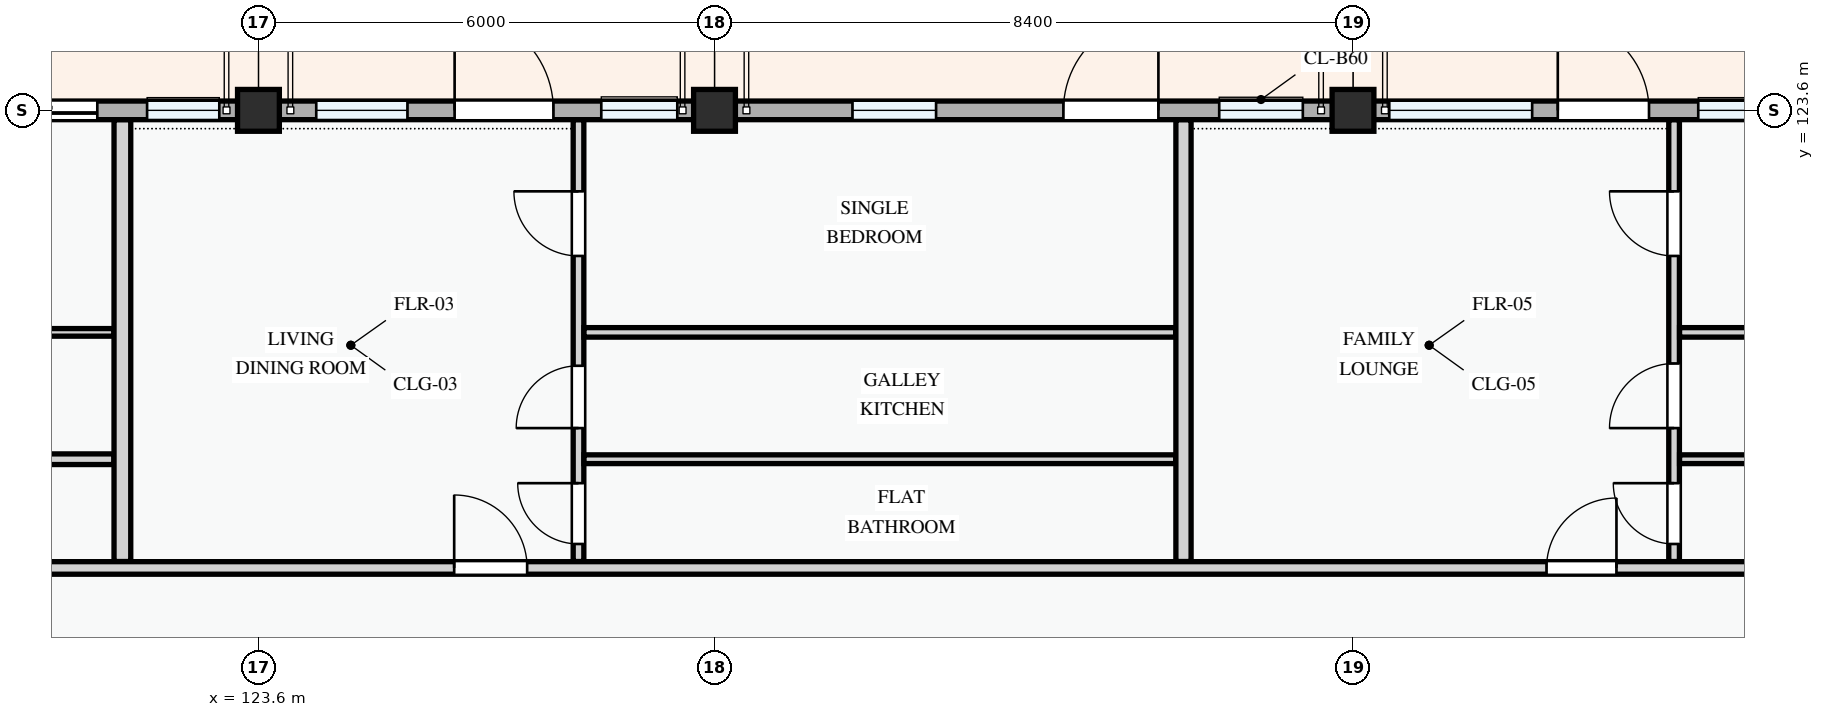
"""IFC4 building model, lengths in metres.
Left out: names, types, materials, properties, quantities, classifications, styles, units other than length and angle.
Written with IfcOpenShell. Run it as: python <this file> out.ifc"""

import sys

from ifc_helpers import new_model, si_unit, direction, frame, frame_2d, origin, origin_2d, place, context, subcontext, project, spatial, rectangle, extrude, element, fill, save


model = new_model("IFC4")
c1 = context("Model", 3, precision=1e-05, world=origin(), true_north=direction((0.0, 1.0)))
c2 = subcontext(c1, "Body", "Model", "MODEL_VIEW")
j1 = project(units=[si_unit("LENGTHUNIT", "METRE"), si_unit("PLANEANGLEUNIT", "RADIAN")], contexts=[c1])
p1 = place(None, origin())
s1 = spatial("IfcSite", under=j1, at=p1, CompositionType="ELEMENT")
p2 = place(p1, origin())
s2 = spatial("IfcBuilding", under=s1, at=p2, CompositionType="ELEMENT")
p3 = place(p2, frame((0.0, 0.0, 37.8)))
s3 = spatial("IfcBuildingStorey", under=s2, at=p3, CompositionType="ELEMENT", Elevation=37.8)
for number, where, z_axis, x_axis in (
    (1, (123.6, 123.6, 0.0), (0.0, 0.0, 1.0), (1.0, 0.0, 0.0)),
    (2, (129.6, 123.6, 0.0), (0.0, 0.0, 1.0), (1.0, 0.0, 0.0)),
    (3, (138.0, 123.6, 0.0), (0.0, 0.0, 1.0), (1.0, 0.0, 0.0)),
):
    element("IfcColumn", number, at=place(p3, frame(where, z_axis=z_axis, x_axis=x_axis)), inside=s3, PredefinedType="COLUMN", context=c2, shape_type="SweptSolid", body=[
        extrude(rectangle(XDim=0.55, YDim=0.55, at=origin_2d()), origin(), (0.0, 0.0, 1.0), 3.3),
    ])
p4 = place(p3, frame((144.0, 123.6, 0.0), z_axis=(0.0, 0.0, 1.0), x_axis=(-1.0, 0.0, 0.0)))
e4 = element("IfcWall", 4, at=p4, inside=s3, PredefinedType="STANDARD", context=c2, shape_type="SweptSolid", body=[
    extrude(rectangle(XDim=6.0, YDim=0.245, at=frame_2d((3.0, 0.0))), origin(), (0.0, 0.0, 1.0), 2.525),
])
p5 = place(p4, frame((2.106, 0.0, 0.0)))
e5 = element("IfcOpeningElement", 5, at=p5, cuts=e4, PredefinedType="OPENING", context=c2, shape_type="SweptSolid", body=[
    extrude(rectangle(XDim=1.2, YDim=2.15, at=frame_2d((0.6, 1.075))), frame((0.0, 0.133, 0.0), z_axis=(0.0, -1.0, 0.0), x_axis=(1.0, 0.0, 0.0)), (0.0, 0.0, 1.0), 0.265),
])
p6 = place(p4, frame((0.508, 0.0, 0.78)))
e6 = element("IfcOpeningElement", 6, at=p6, cuts=e4, PredefinedType="OPENING", context=c2, shape_type="SweptSolid", body=[
    extrude(rectangle(XDim=0.95, YDim=1.15, at=frame_2d((0.475, 0.575))), frame((0.0, 0.133, 0.0), z_axis=(0.0, -1.0, 0.0), x_axis=(1.0, 0.0, 0.0)), (0.0, 0.0, 1.0), 0.265),
])
p7 = place(p4, frame((3.643, 0.0, 0.78)))
e7 = element("IfcOpeningElement", 7, at=p7, cuts=e4, PredefinedType="OPENING", context=c2, shape_type="SweptSolid", body=[
    extrude(rectangle(XDim=1.88, YDim=1.52, at=frame_2d((0.94, 0.76))), frame((0.0, 0.133, 0.0), z_axis=(0.0, -1.0, 0.0), x_axis=(1.0, 0.0, 0.0)), (0.0, 0.0, 1.0), 0.265),
])
p8 = place(p3, frame((138.0, 123.6, 0.0), z_axis=(0.0, 0.0, 1.0), x_axis=(-1.0, 0.0, 0.0)))
e8 = element("IfcWall", 8, at=p8, inside=s3, PredefinedType="STANDARD", context=c2, shape_type="SweptSolid", body=[
    extrude(rectangle(XDim=8.4, YDim=0.245, at=frame_2d((4.2, 0.0))), origin(), (0.0, 0.0, 1.0), 2.375),
])
p9 = place(p8, frame((2.56, 0.0, 0.0)))
e9 = element("IfcOpeningElement", 9, at=p9, cuts=e8, PredefinedType="OPENING", context=c2, shape_type="SweptSolid", body=[
    extrude(rectangle(XDim=1.25, YDim=2.2, at=frame_2d((0.625, 1.1))), frame((0.0, 0.133, 0.0), z_axis=(0.0, -1.0, 0.0), x_axis=(1.0, 0.0, 0.0)), (0.0, 0.0, 1.0), 0.265),
])
p10 = place(p8, frame((0.66, 0.0, 0.78)))
e10 = element("IfcOpeningElement", 10, at=p10, cuts=e8, PredefinedType="OPENING", context=c2, shape_type="SweptSolid", body=[
    extrude(rectangle(XDim=1.1, YDim=1.3, at=frame_2d((0.55, 0.65))), frame((0.0, 0.133, 0.0), z_axis=(0.0, -1.0, 0.0), x_axis=(1.0, 0.0, 0.0)), (0.0, 0.0, 1.0), 0.265),
])
p11 = place(p8, frame((5.485, 0.0, 0.78)))
e11 = element("IfcOpeningElement", 11, at=p11, cuts=e8, PredefinedType="OPENING", context=c2, shape_type="SweptSolid", body=[
    extrude(rectangle(XDim=1.1, YDim=1.3, at=frame_2d((0.55, 0.65))), frame((0.0, 0.133, 0.0), z_axis=(0.0, -1.0, 0.0), x_axis=(1.0, 0.0, 0.0)), (0.0, 0.0, 1.0), 0.265),
])
p12 = place(p3, frame((129.6, 123.6, 0.0), z_axis=(0.0, 0.0, 1.0), x_axis=(-1.0, 0.0, 0.0)))
e12 = element("IfcWall", 12, at=p12, inside=s3, PredefinedType="STANDARD", context=c2, shape_type="SweptSolid", body=[
    extrude(rectangle(XDim=6.0, YDim=0.245, at=frame_2d((3.0, 0.0))), origin(), (0.0, 0.0, 1.0), 2.525),
])
p13 = place(p12, frame((2.119, 0.0, 0.0)))
e13 = element("IfcOpeningElement", 13, at=p13, cuts=e12, PredefinedType="OPENING", context=c2, shape_type="SweptSolid", body=[
    extrude(rectangle(XDim=1.3, YDim=2.15, at=frame_2d((0.65, 1.075))), frame((0.0, 0.133, 0.0), z_axis=(0.0, -1.0, 0.0), x_axis=(1.0, 0.0, 0.0)), (0.0, 0.0, 1.0), 0.265),
])
p14 = place(p12, frame((0.49, 0.0, 0.78)))
e14 = element("IfcOpeningElement", 14, at=p14, cuts=e12, PredefinedType="OPENING", context=c2, shape_type="SweptSolid", body=[
    extrude(rectangle(XDim=1.0, YDim=1.25, at=frame_2d((0.5, 0.625))), frame((0.0, 0.133, 0.0), z_axis=(0.0, -1.0, 0.0), x_axis=(1.0, 0.0, 0.0)), (0.0, 0.0, 1.0), 0.265),
])
p15 = place(p12, frame((4.04, 0.0, 0.78)))
e15 = element("IfcOpeningElement", 15, at=p15, cuts=e12, PredefinedType="OPENING", context=c2, shape_type="SweptSolid", body=[
    extrude(rectangle(XDim=1.2, YDim=1.35, at=frame_2d((0.6, 0.675))), frame((0.0, 0.133, 0.0), z_axis=(0.0, -1.0, 0.0), x_axis=(1.0, 0.0, 0.0)), (0.0, 0.0, 1.0), 0.265),
])
p16 = place(p3, frame((123.6, 123.6, 0.0), z_axis=(0.0, 0.0, 1.0), x_axis=(-1.0, 0.0, 0.0)))
e16 = element("IfcWall", 16, at=p16, inside=s3, PredefinedType="STANDARD", context=c2, shape_type="SweptSolid", body=[
    extrude(rectangle(XDim=8.4, YDim=0.245, at=frame_2d((4.2, 0.0))), origin(), (0.0, 0.0, 1.0), 2.375),
])
p17 = place(p16, frame((2.12, 0.0, 0.0)))
e17 = element("IfcOpeningElement", 17, at=p17, cuts=e16, PredefinedType="OPENING", context=c2, shape_type="SweptSolid", body=[
    extrude(rectangle(XDim=1.4, YDim=2.2, at=frame_2d((0.7, 1.1))), frame((0.0, 0.133, 0.0), z_axis=(0.0, -1.0, 0.0), x_axis=(1.0, 0.0, 0.0)), (0.0, 0.0, 1.0), 0.265),
])
p18 = place(p16, frame((0.515, 0.0, 0.78)))
e18 = element("IfcOpeningElement", 18, at=p18, cuts=e16, PredefinedType="OPENING", context=c2, shape_type="SweptSolid", body=[
    extrude(rectangle(XDim=0.95, YDim=1.15, at=frame_2d((0.475, 0.575))), frame((0.0, 0.133, 0.0), z_axis=(0.0, -1.0, 0.0), x_axis=(1.0, 0.0, 0.0)), (0.0, 0.0, 1.0), 0.265),
])
p19 = place(p16, frame((4.593, 0.0, 0.78)))
e19 = element("IfcOpeningElement", 19, at=p19, cuts=e16, PredefinedType="OPENING", context=c2, shape_type="SweptSolid", body=[
    extrude(rectangle(XDim=1.0, YDim=1.25, at=frame_2d((0.5, 0.625))), frame((0.0, 0.133, 0.0), z_axis=(0.0, -1.0, 0.0), x_axis=(1.0, 0.0, 0.0)), (0.0, 0.0, 1.0), 0.265),
])
p20 = place(p16, frame((6.963, 0.0, 0.78)))
e20 = element("IfcOpeningElement", 20, at=p20, cuts=e16, PredefinedType="OPENING", context=c2, shape_type="SweptSolid", body=[
    extrude(rectangle(XDim=0.9, YDim=1.2, at=frame_2d((0.45, 0.6))), frame((0.0, 0.133, 0.0), z_axis=(0.0, -1.0, 0.0), x_axis=(1.0, 0.0, 0.0)), (0.0, 0.0, 1.0), 0.265),
])
p21 = place(p3, frame((117.043, 120.679, 0.0), z_axis=(0.0, 0.0, 1.0), x_axis=(1.0, 0.0, 0.0)))
e21 = element("IfcWall", 21, at=p21, inside=s3, PredefinedType="PARTITIONING", context=c2, shape_type="SweptSolid", body=[
    extrude(rectangle(XDim=4.655, YDim=0.1, at=frame_2d((2.327, 0.0))), origin(), (0.0, 0.0, 1.0), 3.0),
])
p22 = place(p3, frame((117.043, 119.01, 0.0), z_axis=(0.0, 0.0, 1.0), x_axis=(1.0, 0.0, 0.0)))
e22 = element("IfcWall", 22, at=p22, inside=s3, PredefinedType="PARTITIONING", context=c2, shape_type="SweptSolid", body=[
    extrude(rectangle(XDim=4.655, YDim=0.14, at=frame_2d((2.327, 0.0))), origin(), (0.0, 0.0, 1.0), 3.0),
])
p23 = place(p3, frame((127.811, 117.665, 0.0), z_axis=(0.0, 0.0, 1.0), x_axis=(0.0, 1.0, 0.0)))
e23 = element("IfcWall", 23, at=p23, inside=s3, PredefinedType="PARTITIONING", context=c2, shape_type="SweptSolid", body=[
    extrude(rectangle(XDim=5.811, YDim=0.14, at=frame_2d((2.906, 0.0))), origin(), (0.0, 0.0, 1.0), 3.0),
])
p24 = place(p23, frame((0.231, 0.0, 0.0)))
e24 = element("IfcOpeningElement", 24, at=p24, cuts=e23, PredefinedType="OPENING", context=c2, shape_type="SweptSolid", body=[
    extrude(rectangle(XDim=0.8, YDim=2.1, at=frame_2d((0.4, 1.05))), frame((0.0, 0.08, 0.0), z_axis=(0.0, -1.0, 0.0), x_axis=(1.0, 0.0, 0.0)), (0.0, 0.0, 1.0), 0.16),
])
p25 = place(p23, frame((1.755, 0.0, 0.0)))
e25 = element("IfcOpeningElement", 25, at=p25, cuts=e23, PredefinedType="OPENING", context=c2, shape_type="SweptSolid", body=[
    extrude(rectangle(XDim=0.82, YDim=2.08, at=frame_2d((0.41, 1.04))), frame((0.0, 0.08, 0.0), z_axis=(0.0, -1.0, 0.0), x_axis=(1.0, 0.0, 0.0)), (0.0, 0.0, 1.0), 0.16),
])
p26 = place(p23, frame((4.02, 0.0, 0.0)))
e26 = element("IfcOpeningElement", 26, at=p26, cuts=e23, PredefinedType="OPENING", context=c2, shape_type="SweptSolid", body=[
    extrude(rectangle(XDim=0.85, YDim=2.1, at=frame_2d((0.425, 1.05))), frame((0.0, 0.08, 0.0), z_axis=(0.0, -1.0, 0.0), x_axis=(1.0, 0.0, 0.0)), (0.0, 0.0, 1.0), 0.16),
])
p27 = place(p3, frame((127.883, 120.679, 0.0), z_axis=(0.0, 0.0, 1.0), x_axis=(1.0, 0.0, 0.0)))
e27 = element("IfcWall", 27, at=p27, inside=s3, PredefinedType="PARTITIONING", context=c2, shape_type="SweptSolid", body=[
    extrude(rectangle(XDim=7.785, YDim=0.125, at=frame_2d((3.893, 0.0))), origin(), (0.0, 0.0, 1.0), 3.0),
])
p28 = place(p3, frame((127.883, 119.01, 0.0), z_axis=(0.0, 0.0, 1.0), x_axis=(1.0, 0.0, 0.0)))
e28 = element("IfcWall", 28, at=p28, inside=s3, PredefinedType="PARTITIONING", context=c2, shape_type="SweptSolid", body=[
    extrude(rectangle(XDim=7.785, YDim=0.115, at=frame_2d((3.893, 0.0))), origin(), (0.0, 0.0, 1.0), 3.0),
])
p29 = place(p3, frame((121.81, 117.665, 0.0), z_axis=(0.0, 0.0, 1.0), x_axis=(0.0, 1.0, 0.0)))
e29 = element("IfcWall", 29, at=p29, inside=s3, PredefinedType="PARTITIONING", context=c2, shape_type="SweptSolid", body=[
    extrude(rectangle(XDim=5.811, YDim=0.22, at=frame_2d((2.906, 0.0))), origin(), (0.0, 0.0, 1.0), 3.0),
])
p30 = place(p3, frame((142.224, 117.665, 0.0), z_axis=(0.0, 0.0, 1.0), x_axis=(0.0, 1.0, 0.0)))
e30 = element("IfcWall", 30, at=p30, inside=s3, PredefinedType="PARTITIONING", context=c2, shape_type="SweptSolid", body=[
    extrude(rectangle(XDim=5.811, YDim=0.14, at=frame_2d((2.906, 0.0))), origin(), (0.0, 0.0, 1.0), 3.0),
])
p31 = place(p30, frame((0.231, 0.0, 0.0)))
e31 = element("IfcOpeningElement", 31, at=p31, cuts=e30, PredefinedType="OPENING", context=c2, shape_type="SweptSolid", body=[
    extrude(rectangle(XDim=0.8, YDim=2.1, at=frame_2d((0.4, 1.05))), frame((0.0, 0.08, 0.0), z_axis=(0.0, -1.0, 0.0), x_axis=(1.0, 0.0, 0.0)), (0.0, 0.0, 1.0), 0.16),
])
p32 = place(p30, frame((1.755, 0.0, 0.0)))
e32 = element("IfcOpeningElement", 32, at=p32, cuts=e30, PredefinedType="OPENING", context=c2, shape_type="SweptSolid", body=[
    extrude(rectangle(XDim=0.85, YDim=2.1, at=frame_2d((0.425, 1.05))), frame((0.0, 0.08, 0.0), z_axis=(0.0, -1.0, 0.0), x_axis=(1.0, 0.0, 0.0)), (0.0, 0.0, 1.0), 0.16),
])
p33 = place(p30, frame((4.02, 0.0, 0.0)))
e33 = element("IfcOpeningElement", 33, at=p33, cuts=e30, PredefinedType="OPENING", context=c2, shape_type="SweptSolid", body=[
    extrude(rectangle(XDim=0.85, YDim=2.1, at=frame_2d((0.425, 1.05))), frame((0.0, 0.08, 0.0), z_axis=(0.0, -1.0, 0.0), x_axis=(1.0, 0.0, 0.0)), (0.0, 0.0, 1.0), 0.16),
])
p34 = place(p3, frame((142.296, 120.679, 0.0), z_axis=(0.0, 0.0, 1.0), x_axis=(1.0, 0.0, 0.0)))
e34 = element("IfcWall", 34, at=p34, inside=s3, PredefinedType="PARTITIONING", context=c2, shape_type="SweptSolid", body=[
    extrude(rectangle(XDim=7.754, YDim=0.125, at=frame_2d((3.877, 0.0))), origin(), (0.0, 0.0, 1.0), 3.0),
])
p35 = place(p3, frame((142.296, 119.01, 0.0), z_axis=(0.0, 0.0, 1.0), x_axis=(1.0, 0.0, 0.0)))
e35 = element("IfcWall", 35, at=p35, inside=s3, PredefinedType="PARTITIONING", context=c2, shape_type="SweptSolid", body=[
    extrude(rectangle(XDim=7.754, YDim=0.115, at=frame_2d((3.877, 0.0))), origin(), (0.0, 0.0, 1.0), 3.0),
])
p36 = place(p3, frame((135.77, 117.665, 0.0), z_axis=(0.0, 0.0, 1.0), x_axis=(0.0, 1.0, 0.0)))
e36 = element("IfcWall", 36, at=p36, inside=s3, PredefinedType="PARTITIONING", context=c2, shape_type="SweptSolid", body=[
    extrude(rectangle(XDim=5.811, YDim=0.2, at=frame_2d((2.906, 0.0))), origin(), (0.0, 0.0, 1.0), 3.0),
])
p37 = place(p3, frame((109.324, 117.58, 0.0), z_axis=(0.0, 0.0, 1.0), x_axis=(1.0, 0.0, 0.0)))
e37 = element("IfcWall", 37, at=p37, inside=s3, PredefinedType="PARTITIONING", context=c2, shape_type="SweptSolid", body=[
    extrude(rectangle(XDim=43.216, YDim=0.165, at=frame_2d((21.608, 0.0))), origin(), (0.0, 0.0, 1.0), 3.0),
])
p38 = place(p37, frame((2.339, 0.0, 0.0)))
e38 = element("IfcOpeningElement", 38, at=p38, cuts=e37, PredefinedType="OPENING", context=c2, shape_type="SweptSolid", body=[
    extrude(rectangle(XDim=0.92, YDim=2.1, at=frame_2d((0.46, 1.05))), frame((0.0, 0.093, 0.0), z_axis=(0.0, -1.0, 0.0), x_axis=(1.0, 0.0, 0.0)), (0.0, 0.0, 1.0), 0.185),
])
p39 = place(p37, frame((16.851, 0.0, 0.0)))
e39 = element("IfcOpeningElement", 39, at=p39, cuts=e37, PredefinedType="OPENING", context=c2, shape_type="SweptSolid", body=[
    extrude(rectangle(XDim=0.96, YDim=2.12, at=frame_2d((0.48, 1.06))), frame((0.0, 0.093, 0.0), z_axis=(0.0, -1.0, 0.0), x_axis=(1.0, 0.0, 0.0)), (0.0, 0.0, 1.0), 0.185),
])
p40 = place(p37, frame((31.222, 0.0, 0.0)))
e40 = element("IfcOpeningElement", 40, at=p40, cuts=e37, PredefinedType="OPENING", context=c2, shape_type="SweptSolid", body=[
    extrude(rectangle(XDim=0.92, YDim=2.1, at=frame_2d((0.46, 1.05))), frame((0.0, 0.093, 0.0), z_axis=(0.0, -1.0, 0.0), x_axis=(1.0, 0.0, 0.0)), (0.0, 0.0, 1.0), 0.185),
])
p41 = place(p5, frame((1.2, 0.0, 0.0), z_axis=(0.0, 0.0, 1.0), x_axis=(-1.0, 0.0, 0.0)))
e41 = element("IfcDoor", 41, at=p41, inside=s3, OperationType="SINGLE_SWING_LEFT", PredefinedType="DOOR", context=c2, shape_type="SweptSolid", body=[
    extrude(rectangle(XDim=1.2, YDim=2.15, at=frame_2d((0.6, 1.075))), frame((0.0, 0.025, 0.0), z_axis=(0.0, -1.0, 0.0), x_axis=(1.0, 0.0, 0.0)), (0.0, 0.0, 1.0), 0.05),
])
fill(e5, e41)
p42 = place(p6, origin())
e42 = element("IfcWindow", 42, at=p42, inside=s3, PartitioningType="SINGLE_PANEL", PredefinedType="WINDOW", context=c2, shape_type="SweptSolid", body=[
    extrude(rectangle(XDim=0.95, YDim=1.15, at=frame_2d((0.475, 0.575))), frame((0.0, 0.03, 0.0), z_axis=(0.0, -1.0, 0.0), x_axis=(1.0, 0.0, 0.0)), (0.0, 0.0, 1.0), 0.06),
])
fill(e6, e42)
p43 = place(p7, origin())
e43 = element("IfcWindow", 43, at=p43, inside=s3, PartitioningType="DOUBLE_PANEL_VERTICAL", PredefinedType="WINDOW", context=c2, shape_type="SweptSolid", body=[
    extrude(rectangle(XDim=1.88, YDim=1.52, at=frame_2d((0.94, 0.76))), frame((0.0, 0.03, 0.0), z_axis=(0.0, -1.0, 0.0), x_axis=(1.0, 0.0, 0.0)), (0.0, 0.0, 1.0), 0.06),
])
fill(e7, e43)
p44 = place(p9, frame((1.25, 0.0, 0.0), z_axis=(0.0, 0.0, 1.0), x_axis=(-1.0, 0.0, 0.0)))
e44 = element("IfcDoor", 44, at=p44, inside=s3, OperationType="SINGLE_SWING_RIGHT", PredefinedType="DOOR", context=c2, shape_type="SweptSolid", body=[
    extrude(rectangle(XDim=1.25, YDim=2.2, at=frame_2d((0.625, 1.1))), frame((0.0, 0.025, 0.0), z_axis=(0.0, -1.0, 0.0), x_axis=(1.0, 0.0, 0.0)), (0.0, 0.0, 1.0), 0.05),
])
fill(e9, e44)
p45 = place(p10, origin())
e45 = element("IfcWindow", 45, at=p45, inside=s3, PartitioningType="SINGLE_PANEL", PredefinedType="WINDOW", context=c2, shape_type="SweptSolid", body=[
    extrude(rectangle(XDim=1.1, YDim=1.3, at=frame_2d((0.55, 0.65))), frame((0.0, 0.03, 0.0), z_axis=(0.0, -1.0, 0.0), x_axis=(1.0, 0.0, 0.0)), (0.0, 0.0, 1.0), 0.06),
])
fill(e10, e45)
p46 = place(p11, origin())
e46 = element("IfcWindow", 46, at=p46, inside=s3, PartitioningType="SINGLE_PANEL", PredefinedType="WINDOW", context=c2, shape_type="SweptSolid", body=[
    extrude(rectangle(XDim=1.1, YDim=1.3, at=frame_2d((0.55, 0.65))), frame((0.0, 0.03, 0.0), z_axis=(0.0, -1.0, 0.0), x_axis=(1.0, 0.0, 0.0)), (0.0, 0.0, 1.0), 0.06),
])
fill(e11, e46)
p47 = place(p13, frame((1.3, 0.0, 0.0), z_axis=(0.0, 0.0, 1.0), x_axis=(-1.0, 0.0, 0.0)))
e47 = element("IfcDoor", 47, at=p47, inside=s3, OperationType="SINGLE_SWING_LEFT", PredefinedType="DOOR", context=c2, shape_type="SweptSolid", body=[
    extrude(rectangle(XDim=1.3, YDim=2.15, at=frame_2d((0.65, 1.075))), frame((0.0, 0.025, 0.0), z_axis=(0.0, -1.0, 0.0), x_axis=(1.0, 0.0, 0.0)), (0.0, 0.0, 1.0), 0.05),
])
fill(e13, e47)
p48 = place(p14, origin())
e48 = element("IfcWindow", 48, at=p48, inside=s3, PartitioningType="SINGLE_PANEL", PredefinedType="WINDOW", context=c2, shape_type="SweptSolid", body=[
    extrude(rectangle(XDim=1.0, YDim=1.25, at=frame_2d((0.5, 0.625))), frame((0.0, 0.03, 0.0), z_axis=(0.0, -1.0, 0.0), x_axis=(1.0, 0.0, 0.0)), (0.0, 0.0, 1.0), 0.06),
])
fill(e14, e48)
p49 = place(p15, origin())
e49 = element("IfcWindow", 49, at=p49, inside=s3, PartitioningType="SINGLE_PANEL", PredefinedType="WINDOW", context=c2, shape_type="SweptSolid", body=[
    extrude(rectangle(XDim=1.2, YDim=1.35, at=frame_2d((0.6, 0.675))), frame((0.0, 0.03, 0.0), z_axis=(0.0, -1.0, 0.0), x_axis=(1.0, 0.0, 0.0)), (0.0, 0.0, 1.0), 0.06),
])
fill(e15, e49)
p50 = place(p17, frame((1.4, 0.0, 0.0), z_axis=(0.0, 0.0, 1.0), x_axis=(-1.0, 0.0, 0.0)))
e50 = element("IfcDoor", 50, at=p50, inside=s3, OperationType="SLIDING_TO_LEFT", PredefinedType="DOOR", context=c2, shape_type="SweptSolid", body=[
    extrude(rectangle(XDim=1.4, YDim=2.2, at=frame_2d((0.7, 1.1))), frame((0.0, 0.025, 0.0), z_axis=(0.0, -1.0, 0.0), x_axis=(1.0, 0.0, 0.0)), (0.0, 0.0, 1.0), 0.05),
])
fill(e17, e50)
p51 = place(p18, origin())
e51 = element("IfcWindow", 51, at=p51, inside=s3, PartitioningType="SINGLE_PANEL", PredefinedType="WINDOW", context=c2, shape_type="SweptSolid", body=[
    extrude(rectangle(XDim=0.95, YDim=1.15, at=frame_2d((0.475, 0.575))), frame((0.0, 0.03, 0.0), z_axis=(0.0, -1.0, 0.0), x_axis=(1.0, 0.0, 0.0)), (0.0, 0.0, 1.0), 0.06),
])
fill(e18, e51)
p52 = place(p24, origin())
e52 = element("IfcDoor", 52, at=p52, inside=s3, OperationType="SINGLE_SWING_RIGHT", PredefinedType="DOOR", context=c2, shape_type="SweptSolid", body=[
    extrude(rectangle(XDim=0.8, YDim=2.1, at=frame_2d((0.4, 1.05))), frame((0.0, 0.025, 0.0), z_axis=(0.0, -1.0, 0.0), x_axis=(1.0, 0.0, 0.0)), (0.0, 0.0, 1.0), 0.05),
])
fill(e24, e52)
p53 = place(p25, origin())
e53 = element("IfcDoor", 53, at=p53, inside=s3, OperationType="SINGLE_SWING_LEFT", PredefinedType="DOOR", context=c2, shape_type="SweptSolid", body=[
    extrude(rectangle(XDim=0.82, YDim=2.08, at=frame_2d((0.41, 1.04))), frame((0.0, 0.025, 0.0), z_axis=(0.0, -1.0, 0.0), x_axis=(1.0, 0.0, 0.0)), (0.0, 0.0, 1.0), 0.05),
])
fill(e25, e53)
p54 = place(p26, origin())
e54 = element("IfcDoor", 54, at=p54, inside=s3, OperationType="SINGLE_SWING_RIGHT", PredefinedType="DOOR", context=c2, shape_type="SweptSolid", body=[
    extrude(rectangle(XDim=0.85, YDim=2.1, at=frame_2d((0.425, 1.05))), frame((0.0, 0.025, 0.0), z_axis=(0.0, -1.0, 0.0), x_axis=(1.0, 0.0, 0.0)), (0.0, 0.0, 1.0), 0.05),
])
fill(e26, e54)
p55 = place(p31, origin())
e55 = element("IfcDoor", 55, at=p55, inside=s3, OperationType="SINGLE_SWING_RIGHT", PredefinedType="DOOR", context=c2, shape_type="SweptSolid", body=[
    extrude(rectangle(XDim=0.8, YDim=2.1, at=frame_2d((0.4, 1.05))), frame((0.0, 0.025, 0.0), z_axis=(0.0, -1.0, 0.0), x_axis=(1.0, 0.0, 0.0)), (0.0, 0.0, 1.0), 0.05),
])
fill(e31, e55)
p56 = place(p32, origin())
e56 = element("IfcDoor", 56, at=p56, inside=s3, OperationType="SINGLE_SWING_LEFT", PredefinedType="DOOR", context=c2, shape_type="SweptSolid", body=[
    extrude(rectangle(XDim=0.85, YDim=2.1, at=frame_2d((0.425, 1.05))), frame((0.0, 0.025, 0.0), z_axis=(0.0, -1.0, 0.0), x_axis=(1.0, 0.0, 0.0)), (0.0, 0.0, 1.0), 0.05),
])
fill(e32, e56)
p57 = place(p33, origin())
e57 = element("IfcDoor", 57, at=p57, inside=s3, OperationType="SINGLE_SWING_RIGHT", PredefinedType="DOOR", context=c2, shape_type="SweptSolid", body=[
    extrude(rectangle(XDim=0.85, YDim=2.1, at=frame_2d((0.425, 1.05))), frame((0.0, 0.025, 0.0), z_axis=(0.0, -1.0, 0.0), x_axis=(1.0, 0.0, 0.0)), (0.0, 0.0, 1.0), 0.05),
])
fill(e33, e57)
p58 = place(p39, origin())
e58 = element("IfcDoor", 58, at=p58, inside=s3, OperationType="SINGLE_SWING_LEFT", PredefinedType="DOOR", context=c2, shape_type="SweptSolid", body=[
    extrude(rectangle(XDim=0.96, YDim=2.12, at=frame_2d((0.48, 1.06))), frame((0.0, 0.025, 0.0), z_axis=(0.0, -1.0, 0.0), x_axis=(1.0, 0.0, 0.0)), (0.0, 0.0, 1.0), 0.05),
])
fill(e39, e58)
p59 = place(p40, origin())
e59 = element("IfcDoor", 59, at=p59, inside=s3, OperationType="SINGLE_SWING_RIGHT", PredefinedType="DOOR", context=c2, shape_type="SweptSolid", body=[
    extrude(rectangle(XDim=0.92, YDim=2.1, at=frame_2d((0.46, 1.05))), frame((0.0, 0.025, 0.0), z_axis=(0.0, -1.0, 0.0), x_axis=(1.0, 0.0, 0.0)), (0.0, 0.0, 1.0), 0.05),
])
fill(e40, e59)
save(model, sys.argv[1])
